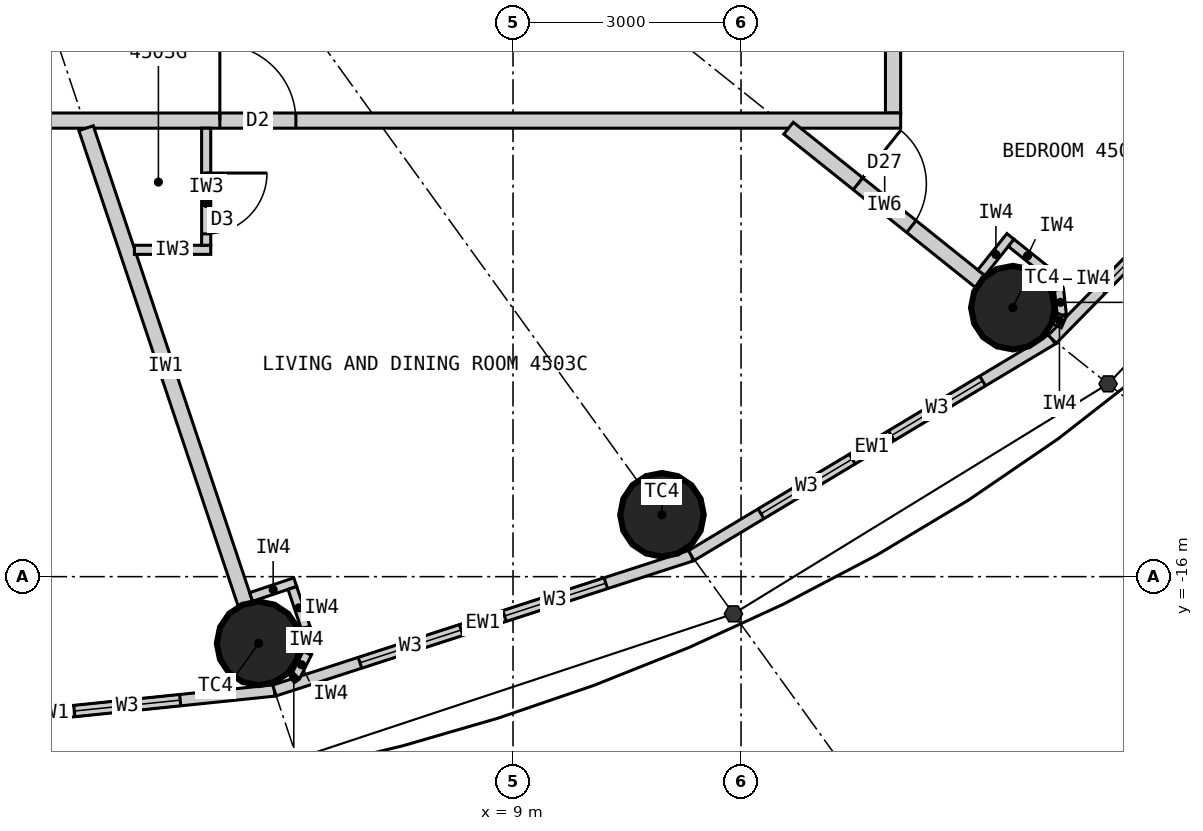
"""IFC4 building model, lengths in metres.
Left out: names, types, materials, properties, quantities, classifications, styles, units other than length and angle.
Written with IfcOpenShell. Run it as: python <this file> out.ifc"""

import sys

from ifc_helpers import new_model, si_unit, direction, frame, frame_2d, origin, origin_2d, place, context, subcontext, project, spatial, rectangle, circle, extrude, element, fill, save


model = new_model("IFC4")
c1 = context("Model", 3, precision=1e-05, world=origin(), true_north=direction((0.0, 1.0)))
c2 = subcontext(c1, "Body", "Model", "MODEL_VIEW")
j1 = project(units=[si_unit("LENGTHUNIT", "METRE"), si_unit("PLANEANGLEUNIT", "RADIAN")], contexts=[c1])
p1 = place(None, origin())
s1 = spatial("IfcSite", under=j1, at=p1, CompositionType="ELEMENT")
p2 = place(p1, origin())
s2 = spatial("IfcBuilding", under=s1, at=p2, CompositionType="ELEMENT")
p3 = place(p2, frame((0.0, 0.0, 169.8)))
s3 = spatial("IfcBuildingStorey", under=s2, at=p3, CompositionType="ELEMENT", Elevation=169.8)
for number, where, z_axis, x_axis in (
    (1, (5.653, -16.877, 0.0), (0.0, 0.0, 1.0), (1.0, 0.0, 0.0)),
    (2, (10.96, -15.186, 0.0), (0.0, 0.0, 1.0), (1.0, 0.0, 0.0)),
    (3, (15.576, -12.461, 0.0), (0.0, 0.0, 1.0), (1.0, 0.0, 0.0)),
):
    element("IfcColumn", number, at=place(p3, frame(where, z_axis=z_axis, x_axis=x_axis)), inside=s3, PredefinedType="COLUMN", context=c2, shape_type="SweptSolid", body=[
        extrude(circle(Radius=0.55, at=origin_2d()), origin(), (0.0, 0.0, 1.0), 3.3),
    ])
p4 = place(p3, frame((0.0, -18.1, 0.0), z_axis=(0.0, 0.0, 1.0), x_axis=(0.994751738032, 0.102318032045, 0.0)))
e4 = element("IfcWall", 4, at=p4, inside=s3, PredefinedType="ELEMENTEDWALL", context=c2, shape_type="SweptSolid", body=[
    extrude(rectangle(XDim=5.891, YDim=0.15, at=frame_2d((2.946, 0.0))), origin(), (0.0, 0.0, 1.0), 3.12),
])
p5 = place(p4, frame((1.246, 0.0, 0.9)))
e5 = element("IfcOpeningElement", 5, at=p5, cuts=e4, PredefinedType="OPENING", context=c2, shape_type="SweptSolid", body=[
    extrude(rectangle(XDim=1.4, YDim=1.9, at=frame_2d((0.7, 0.95))), frame((0.0, 0.085, 0.0), z_axis=(0.0, -1.0, 0.0), x_axis=(1.0, 0.0, 0.0)), (0.0, 0.0, 1.0), 0.17),
])
p6 = place(p4, frame((3.246, 0.0, 0.9)))
e6 = element("IfcOpeningElement", 6, at=p6, cuts=e4, PredefinedType="OPENING", context=c2, shape_type="SweptSolid", body=[
    extrude(rectangle(XDim=1.4, YDim=1.9, at=frame_2d((0.7, 0.95))), frame((0.0, 0.085, 0.0), z_axis=(0.0, -1.0, 0.0), x_axis=(1.0, 0.0, 0.0)), (0.0, 0.0, 1.0), 0.17),
])
p7 = place(p3, frame((5.86, -17.497, 0.0), z_axis=(0.0, 0.0, 1.0), x_axis=(0.951432482129, 0.307857486429, 0.0)))
e7 = element("IfcWall", 7, at=p7, inside=s3, PredefinedType="ELEMENTEDWALL", context=c2, shape_type="SweptSolid", body=[
    extrude(rectangle(XDim=5.766, YDim=0.15, at=frame_2d((2.883, 0.0))), origin(), (0.0, 0.0, 1.0), 3.12),
])
p8 = place(p7, frame((1.183, 0.0, 0.9)))
e8 = element("IfcOpeningElement", 8, at=p8, cuts=e7, PredefinedType="OPENING", context=c2, shape_type="SweptSolid", body=[
    extrude(rectangle(XDim=1.4, YDim=1.9, at=frame_2d((0.7, 0.95))), frame((0.0, 0.085, 0.0), z_axis=(0.0, -1.0, 0.0), x_axis=(1.0, 0.0, 0.0)), (0.0, 0.0, 1.0), 0.17),
])
p9 = place(p7, frame((3.183, 0.0, 0.9)))
e9 = element("IfcOpeningElement", 9, at=p9, cuts=e7, PredefinedType="OPENING", context=c2, shape_type="SweptSolid", body=[
    extrude(rectangle(XDim=1.4, YDim=1.9, at=frame_2d((0.7, 0.95))), frame((0.0, 0.085, 0.0), z_axis=(0.0, -1.0, 0.0), x_axis=(1.0, 0.0, 0.0)), (0.0, 0.0, 1.0), 0.17),
])
p10 = place(p3, frame((11.346, -15.722, 0.0), z_axis=(0.0, 0.0, 1.0), x_axis=(0.857695199231, 0.514158482587, 0.0)))
e10 = element("IfcWall", 10, at=p10, inside=s3, PredefinedType="ELEMENTEDWALL", context=c2, shape_type="SweptSolid", body=[
    extrude(rectangle(XDim=5.536, YDim=0.15, at=frame_2d((2.768, 0.0))), origin(), (0.0, 0.0, 1.0), 3.12),
])
p11 = place(p10, frame((1.068, 0.0, 0.9)))
e11 = element("IfcOpeningElement", 11, at=p11, cuts=e10, PredefinedType="OPENING", context=c2, shape_type="SweptSolid", body=[
    extrude(rectangle(XDim=1.4, YDim=1.9, at=frame_2d((0.7, 0.95))), frame((0.0, 0.085, 0.0), z_axis=(0.0, -1.0, 0.0), x_axis=(1.0, 0.0, 0.0)), (0.0, 0.0, 1.0), 0.17),
])
p12 = place(p10, frame((3.068, 0.0, 0.9)))
e12 = element("IfcOpeningElement", 12, at=p12, cuts=e10, PredefinedType="OPENING", context=c2, shape_type="SweptSolid", body=[
    extrude(rectangle(XDim=1.4, YDim=1.9, at=frame_2d((0.7, 0.95))), frame((0.0, 0.085, 0.0), z_axis=(0.0, -1.0, 0.0), x_axis=(1.0, 0.0, 0.0)), (0.0, 0.0, 1.0), 0.17),
])
p13 = place(p3, frame((16.095, -12.876, 0.0), z_axis=(0.0, 0.0, 1.0), x_axis=(0.700727467776, 0.71342905457, 0.0)))
e13 = element("IfcWall", 13, at=p13, inside=s3, PredefinedType="ELEMENTEDWALL", context=c2, shape_type="SweptSolid", body=[
    extrude(rectangle(XDim=5.247, YDim=0.15, at=frame_2d((2.624, 0.0))), origin(), (0.0, 0.0, 1.0), 3.12),
])
p14 = place(p13, frame((0.924, 0.0, 0.9)))
e14 = element("IfcOpeningElement", 14, at=p14, cuts=e13, PredefinedType="OPENING", context=c2, shape_type="SweptSolid", body=[
    extrude(rectangle(XDim=1.4, YDim=1.9, at=frame_2d((0.7, 0.95))), frame((0.0, 0.085, 0.0), z_axis=(0.0, -1.0, 0.0), x_axis=(1.0, 0.0, 0.0)), (0.0, 0.0, 1.0), 0.17),
])
p15 = place(p13, frame((2.924, 0.0, 0.9)))
e15 = element("IfcOpeningElement", 15, at=p15, cuts=e13, PredefinedType="OPENING", context=c2, shape_type="SweptSolid", body=[
    extrude(rectangle(XDim=1.4, YDim=1.9, at=frame_2d((0.7, 0.95))), frame((0.0, 0.085, 0.0), z_axis=(0.0, -1.0, 0.0), x_axis=(1.0, 0.0, 0.0)), (0.0, 0.0, 1.0), 0.17),
])
p16 = place(p3, frame((14.0, -9.9, 0.0), z_axis=(0.0, 0.0, 1.0), x_axis=(0.0, 1.0, 0.0)))
e16 = element("IfcWall", 16, at=p16, inside=s3, PredefinedType="PARTITIONING", context=c2, shape_type="SweptSolid", body=[
    extrude(rectangle(XDim=19.8, YDim=0.2, at=frame_2d((9.9, 0.0))), origin(), (0.0, 0.0, 1.0), 3.12),
])
p17 = place(p16, frame((3.688, 0.0, 0.0)))
e17 = element("IfcOpeningElement", 17, at=p17, cuts=e16, PredefinedType="OPENING", context=c2, shape_type="SweptSolid", body=[
    extrude(rectangle(XDim=1.0, YDim=2.2, at=frame_2d((0.5, 1.1))), frame((0.0, 0.11, 0.0), z_axis=(0.0, -1.0, 0.0), x_axis=(1.0, 0.0, 0.0)), (0.0, 0.0, 1.0), 0.22),
])
p18 = place(p16, frame((9.979, 0.0, 0.0)))
e18 = element("IfcOpeningElement", 18, at=p18, cuts=e16, PredefinedType="OPENING", context=c2, shape_type="SweptSolid", body=[
    extrude(rectangle(XDim=1.0, YDim=2.2, at=frame_2d((0.5, 1.1))), frame((0.0, 0.11, 0.0), z_axis=(0.0, -1.0, 0.0), x_axis=(1.0, 0.0, 0.0)), (0.0, 0.0, 1.0), 0.22),
])
p19 = place(p16, frame((17.122, 0.0, 0.0)))
e19 = element("IfcOpeningElement", 19, at=p19, cuts=e16, PredefinedType="OPENING", context=c2, shape_type="SweptSolid", body=[
    extrude(rectangle(XDim=1.0, YDim=2.2, at=frame_2d((0.5, 1.1))), frame((0.0, 0.11, 0.0), z_axis=(0.0, -1.0, 0.0), x_axis=(1.0, 0.0, 0.0)), (0.0, 0.0, 1.0), 0.22),
])
p20 = place(p3, frame((14.1, -10.0, 0.0), z_axis=(0.0, 0.0, 1.0), x_axis=(-1.0, 0.0, 0.0)))
e20 = element("IfcWall", 20, at=p20, inside=s3, PredefinedType="PARTITIONING", context=c2, shape_type="SweptSolid", body=[
    extrude(rectangle(XDim=28.2, YDim=0.2, at=frame_2d((14.1, 0.0))), origin(), (0.0, 0.0, 1.0), 3.12),
])
p21 = place(p20, frame((23.165, 0.0, 0.0)))
e21 = element("IfcOpeningElement", 21, at=p21, cuts=e20, PredefinedType="OPENING", context=c2, shape_type="SweptSolid", body=[
    extrude(rectangle(XDim=1.0, YDim=2.2, at=frame_2d((0.5, 1.1))), frame((0.0, 0.11, 0.0), z_axis=(0.0, -1.0, 0.0), x_axis=(1.0, 0.0, 0.0)), (0.0, 0.0, 1.0), 0.22),
])
p22 = place(p20, frame((13.923, 0.0, 0.0)))
e22 = element("IfcOpeningElement", 22, at=p22, cuts=e20, PredefinedType="OPENING", context=c2, shape_type="SweptSolid", body=[
    extrude(rectangle(XDim=1.0, YDim=2.2, at=frame_2d((0.5, 1.1))), frame((0.0, 0.11, 0.0), z_axis=(0.0, -1.0, 0.0), x_axis=(1.0, 0.0, 0.0)), (0.0, 0.0, 1.0), 0.22),
])
p23 = place(p20, frame((7.957, 0.0, 0.0)))
e23 = element("IfcOpeningElement", 23, at=p23, cuts=e20, PredefinedType="OPENING", context=c2, shape_type="SweptSolid", body=[
    extrude(rectangle(XDim=1.0, YDim=2.2, at=frame_2d((0.5, 1.1))), frame((0.0, 0.11, 0.0), z_axis=(0.0, -1.0, 0.0), x_axis=(1.0, 0.0, 0.0)), (0.0, 0.0, 1.0), 0.22),
])
p24 = place(p3, frame((3.383, -10.1, 0.0), z_axis=(0.0, 0.0, 1.0), x_axis=(0.317615120474, -0.948219718866, 0.0)))
e24 = element("IfcWall", 24, at=p24, inside=s3, PredefinedType="PARTITIONING", context=c2, shape_type="SweptSolid", body=[
    extrude(rectangle(XDim=6.597, YDim=0.2, at=frame_2d((3.299, 0.0))), origin(), (0.0, 0.0, 1.0), 2.42),
])
p25 = place(p3, frame((12.625, -10.1, 0.0), z_axis=(0.0, 0.0, 1.0), x_axis=(0.780876185034, -0.624685827954, 0.0)))
e25 = element("IfcWall", 25, at=p25, inside=s3, PredefinedType="PARTITIONING", context=c2, shape_type="SweptSolid", body=[
    extrude(rectangle(XDim=3.229, YDim=0.2, at=frame_2d((1.615, 0.0))), origin(), (0.0, 0.0, 1.0), 2.42),
])
p26 = place(p25, frame((1.17, 0.0, 0.0)))
e26 = element("IfcOpeningElement", 26, at=p26, cuts=e25, PredefinedType="OPENING", context=c2, shape_type="SweptSolid", body=[
    extrude(rectangle(XDim=0.9, YDim=2.1, at=frame_2d((0.45, 1.05))), frame((0.0, 0.11, 0.0), z_axis=(0.0, -1.0, 0.0), x_axis=(1.0, 0.0, 0.0)), (0.0, 0.0, 1.0), 0.22),
])
p27 = place(p3, frame((4.019, -11.7, 0.0), z_axis=(0.0, 0.0, 1.0), x_axis=(1.0, 0.0, 0.0)))
e27 = element("IfcWall", 27, at=p27, inside=s3, PredefinedType="PARTITIONING", context=c2, shape_type="SweptSolid", body=[
    extrude(rectangle(XDim=1.004, YDim=0.12, at=frame_2d((0.502, 0.0))), origin(), (0.0, 0.0, 1.0), 3.12),
])
p28 = place(p3, frame((4.963, -10.1, 0.0), z_axis=(0.0, 0.0, 1.0), x_axis=(0.0, -1.0, 0.0)))
e28 = element("IfcWall", 28, at=p28, inside=s3, PredefinedType="PARTITIONING", context=c2, shape_type="SweptSolid", body=[
    extrude(rectangle(XDim=1.54, YDim=0.12, at=frame_2d((0.77, 0.0))), origin(), (0.0, 0.0, 1.0), 3.12),
])
p29 = place(p28, frame((0.59, 0.0, 0.0)))
e29 = element("IfcOpeningElement", 29, at=p29, cuts=e28, PredefinedType="OPENING", context=c2, shape_type="SweptSolid", body=[
    extrude(rectangle(XDim=0.8, YDim=2.1, at=frame_2d((0.4, 1.05))), frame((0.0, 0.07, 0.0), z_axis=(0.0, -1.0, 0.0), x_axis=(1.0, 0.0, 0.0)), (0.0, 0.0, 1.0), 0.14),
])
p30 = place(p3, frame((5.554, -16.267, 0.0), z_axis=(0.0, 0.0, 1.0), x_axis=(0.948163683492, 0.317782361541, 0.0)))
e30 = element("IfcWall", 30, at=p30, inside=s3, PredefinedType="PARTITIONING", context=c2, shape_type="SweptSolid", body=[
    extrude(rectangle(XDim=0.612, YDim=0.12, at=frame_2d((0.306, 0.0))), origin(), (0.0, 0.0, 1.0), 3.12),
])
p31 = place(p3, frame((6.097, -16.149, 0.0), z_axis=(0.0, 0.0, 1.0), x_axis=(0.317292604854, -0.948327687514, 0.0)))
e31 = element("IfcWall", 31, at=p31, inside=s3, PredefinedType="PARTITIONING", context=c2, shape_type="SweptSolid", body=[
    extrude(rectangle(XDim=0.55, YDim=0.12, at=frame_2d((0.275, 0.0))), origin(), (0.0, 0.0, 1.0), 3.12),
])
for number, where, z_axis, x_axis in (
    (32, (6.271, -16.67, 0.0), (0.0, 0.0, 1.0), (0.061, -0.998, 0.0)),
    (33, (6.292, -17.007, 0.0), (0.0, 0.0, 1.0), (-0.445, -0.895, 0.0)),
):
    element("IfcWall", number, at=place(p3, frame(where, z_axis=z_axis, x_axis=x_axis)), inside=s3, PredefinedType="PARTITIONING", context=c2, shape_type="SweptSolid", body=[
        extrude(rectangle(XDim=0.338, YDim=0.12, at=frame_2d((0.169, 0.0))), origin(), (0.0, 0.0, 1.0), 3.12),
    ])
p32 = place(p3, frame((6.142, -17.31, 0.0), z_axis=(0.0, 0.0, 1.0), x_axis=(-0.835039693181, -0.550189704386, 0.0)))
e34 = element("IfcWall", 34, at=p32, inside=s3, PredefinedType="PARTITIONING", context=c2, shape_type="SweptSolid", body=[
    extrude(rectangle(XDim=0.062, YDim=0.12, at=frame_2d((0.031, 0.0))), origin(), (0.0, 0.0, 1.0), 3.12),
])
p33 = place(p3, frame((15.162, -12.002, 0.0), z_axis=(0.0, 0.0, 1.0), x_axis=(0.624597762427, 0.780946627607, 0.0)))
e35 = element("IfcWall", 35, at=p33, inside=s3, PredefinedType="PARTITIONING", context=c2, shape_type="SweptSolid", body=[
    extrude(rectangle(XDim=0.612, YDim=0.12, at=frame_2d((0.306, 0.0))), origin(), (0.0, 0.0, 1.0), 3.12),
])
p34 = place(p3, frame((15.554, -11.608, 0.0), z_axis=(0.0, 0.0, 1.0), x_axis=(0.780695577787, -0.624911525597, 0.0)))
e36 = element("IfcWall", 36, at=p34, inside=s3, PredefinedType="PARTITIONING", context=c2, shape_type="SweptSolid", body=[
    extrude(rectangle(XDim=0.55, YDim=0.12, at=frame_2d((0.275, 0.0))), origin(), (0.0, 0.0, 1.0), 3.12),
])
p35 = place(p3, frame((15.984, -11.952, 0.0), z_axis=(0.0, 0.0, 1.0), x_axis=(0.592335221171, -0.805691619517, 0.0)))
e37 = element("IfcWall", 37, at=p35, inside=s3, PredefinedType="PARTITIONING", context=c2, shape_type="SweptSolid", body=[
    extrude(rectangle(XDim=0.338, YDim=0.12, at=frame_2d((0.169, 0.0))), origin(), (0.0, 0.0, 1.0), 3.12),
])
p36 = place(p3, frame((16.184, -12.224, 0.0), z_axis=(0.0, 0.0, 1.0), x_axis=(0.110669692975, -0.993857242795, 0.0)))
e38 = element("IfcWall", 38, at=p36, inside=s3, PredefinedType="PARTITIONING", context=c2, shape_type="SweptSolid", body=[
    extrude(rectangle(XDim=0.337, YDim=0.12, at=frame_2d((0.169, 0.0))), origin(), (0.0, 0.0, 1.0), 3.12),
])
p37 = place(p3, frame((16.221, -12.559, 0.0), z_axis=(0.0, 0.0, 1.0), x_axis=(-0.401064416249, -0.916049853457, 0.0)))
e39 = element("IfcWall", 39, at=p37, inside=s3, PredefinedType="PARTITIONING", context=c2, shape_type="SweptSolid", body=[
    extrude(rectangle(XDim=0.156, YDim=0.12, at=frame_2d((0.078, 0.0))), origin(), (0.0, 0.0, 1.0), 3.12),
])
p38 = place(p6, origin())
e40 = element("IfcWindow", 40, at=p38, inside=s3, PartitioningType="SINGLE_PANEL", PredefinedType="WINDOW", context=c2, shape_type="SweptSolid", body=[
    extrude(rectangle(XDim=1.4, YDim=1.9, at=frame_2d((0.7, 0.95))), frame((0.0, 0.03, 0.0), z_axis=(0.0, -1.0, 0.0), x_axis=(1.0, 0.0, 0.0)), (0.0, 0.0, 1.0), 0.06),
])
fill(e6, e40)
p39 = place(p8, origin())
e41 = element("IfcWindow", 41, at=p39, inside=s3, PartitioningType="SINGLE_PANEL", PredefinedType="WINDOW", context=c2, shape_type="SweptSolid", body=[
    extrude(rectangle(XDim=1.4, YDim=1.9, at=frame_2d((0.7, 0.95))), frame((0.0, 0.03, 0.0), z_axis=(0.0, -1.0, 0.0), x_axis=(1.0, 0.0, 0.0)), (0.0, 0.0, 1.0), 0.06),
])
fill(e8, e41)
p40 = place(p9, origin())
e42 = element("IfcWindow", 42, at=p40, inside=s3, PartitioningType="SINGLE_PANEL", PredefinedType="WINDOW", context=c2, shape_type="SweptSolid", body=[
    extrude(rectangle(XDim=1.4, YDim=1.9, at=frame_2d((0.7, 0.95))), frame((0.0, 0.03, 0.0), z_axis=(0.0, -1.0, 0.0), x_axis=(1.0, 0.0, 0.0)), (0.0, 0.0, 1.0), 0.06),
])
fill(e9, e42)
p41 = place(p11, origin())
e43 = element("IfcWindow", 43, at=p41, inside=s3, PartitioningType="SINGLE_PANEL", PredefinedType="WINDOW", context=c2, shape_type="SweptSolid", body=[
    extrude(rectangle(XDim=1.4, YDim=1.9, at=frame_2d((0.7, 0.95))), frame((0.0, 0.03, 0.0), z_axis=(0.0, -1.0, 0.0), x_axis=(1.0, 0.0, 0.0)), (0.0, 0.0, 1.0), 0.06),
])
fill(e11, e43)
p42 = place(p12, origin())
e44 = element("IfcWindow", 44, at=p42, inside=s3, PartitioningType="SINGLE_PANEL", PredefinedType="WINDOW", context=c2, shape_type="SweptSolid", body=[
    extrude(rectangle(XDim=1.4, YDim=1.9, at=frame_2d((0.7, 0.95))), frame((0.0, 0.03, 0.0), z_axis=(0.0, -1.0, 0.0), x_axis=(1.0, 0.0, 0.0)), (0.0, 0.0, 1.0), 0.06),
])
fill(e12, e44)
p43 = place(p14, origin())
e45 = element("IfcWindow", 45, at=p43, inside=s3, PartitioningType="SINGLE_PANEL", PredefinedType="WINDOW", context=c2, shape_type="SweptSolid", body=[
    extrude(rectangle(XDim=1.4, YDim=1.9, at=frame_2d((0.7, 0.95))), frame((0.0, 0.03, 0.0), z_axis=(0.0, -1.0, 0.0), x_axis=(1.0, 0.0, 0.0)), (0.0, 0.0, 1.0), 0.06),
])
fill(e14, e45)
p44 = place(p29, origin())
e46 = element("IfcDoor", 46, at=p44, inside=s3, OperationType="SINGLE_SWING_LEFT", PredefinedType="DOOR", context=c2, shape_type="SweptSolid", body=[
    extrude(rectangle(XDim=0.8, YDim=2.1, at=frame_2d((0.4, 1.05))), frame((0.0, 0.025, 0.0), z_axis=(0.0, -1.0, 0.0), x_axis=(1.0, 0.0, 0.0)), (0.0, 0.0, 1.0), 0.05),
])
fill(e29, e46)
p45 = place(p23, origin())
e47 = element("IfcDoor", 47, at=p45, inside=s3, OperationType="SINGLE_SWING_RIGHT", PredefinedType="DOOR", context=c2, shape_type="SweptSolid", body=[
    extrude(rectangle(XDim=1.0, YDim=2.2, at=frame_2d((0.5, 1.1))), frame((0.0, 0.025, 0.0), z_axis=(0.0, -1.0, 0.0), x_axis=(1.0, 0.0, 0.0)), (0.0, 0.0, 1.0), 0.05),
])
fill(e23, e47)
p46 = place(p26, origin())
e48 = element("IfcDoor", 48, at=p46, inside=s3, OperationType="SINGLE_SWING_LEFT", PredefinedType="DOOR", context=c2, shape_type="SweptSolid", body=[
    extrude(rectangle(XDim=0.9, YDim=2.1, at=frame_2d((0.45, 1.05))), frame((0.0, 0.025, 0.0), z_axis=(0.0, -1.0, 0.0), x_axis=(1.0, 0.0, 0.0)), (0.0, 0.0, 1.0), 0.05),
])
fill(e26, e48)
save(model, sys.argv[1])
